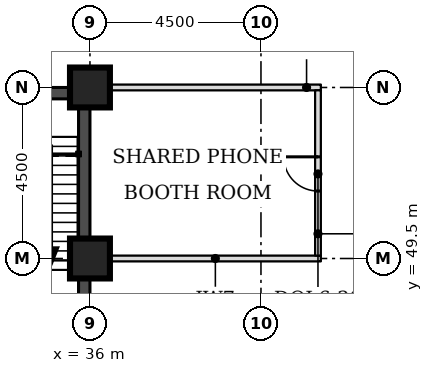
"""IFC4 building model, lengths in metres.
Left out: names, types, materials, properties, quantities, classifications, styles, units other than length and angle.
Written with IfcOpenShell. Run it as: python <this file> out.ifc"""

import sys

from ifc_helpers import new_model, si_unit, direction, frame, frame_2d, origin, origin_2d, place, context, subcontext, project, spatial, rectangle, extrude, element, fill, save


model = new_model("IFC4")
c1 = context("Model", 3, precision=1e-05, world=origin(), true_north=direction((0.0, 1.0)))
c2 = subcontext(c1, "Body", "Model", "MODEL_VIEW")
j1 = project(units=[si_unit("LENGTHUNIT", "METRE"), si_unit("PLANEANGLEUNIT", "RADIAN")], contexts=[c1])
p1 = place(None, origin())
s1 = spatial("IfcSite", under=j1, at=p1, CompositionType="ELEMENT")
p2 = place(p1, origin())
s2 = spatial("IfcBuilding", under=s1, at=p2, CompositionType="ELEMENT")
p3 = place(p2, frame((0.0, 0.0, 119.6)))
s3 = spatial("IfcBuildingStorey", under=s2, at=p3, CompositionType="ELEMENT", Elevation=119.6)
for number, where, z_axis, x_axis in (
    (1, (36.0, 49.5, 0.0), (0.0, 0.0, 1.0), (1.0, 0.0, 0.0)),
    (2, (36.0, 54.0, 0.0), (0.0, 0.0, 1.0), (1.0, 0.0, 0.0)),
):
    element("IfcColumn", number, at=place(p3, frame(where, z_axis=z_axis, x_axis=x_axis)), inside=s3, PredefinedType="COLUMN", context=c2, shape_type="SweptSolid", body=[
        extrude(rectangle(XDim=1.05, YDim=1.05, at=origin_2d()), origin(), (0.0, 0.0, 1.0), 3.7),
    ])
p4 = place(p3, frame((27.3, 53.85, 0.0), z_axis=(0.0, 0.0, 1.0), x_axis=(1.0, 0.0, 0.0)))
e3 = element("IfcWall", 3, at=p4, inside=s3, PredefinedType="SHEAR", context=c2, shape_type="SweptSolid", body=[
    extrude(rectangle(XDim=8.4, YDim=0.3, at=frame_2d((4.2, 0.0))), origin(), (0.0, 0.0, 1.0), 3.7),
])
p5 = place(p4, frame((6.4, 0.0, 0.0)))
e4 = element("IfcOpeningElement", 4, at=p5, cuts=e3, PredefinedType="OPENING", context=c2, shape_type="SweptSolid", body=[
    extrude(rectangle(XDim=1.1, YDim=2.1, at=frame_2d((0.55, 1.05))), frame((0.0, 0.16, 0.0), z_axis=(0.0, -1.0, 0.0), x_axis=(1.0, 0.0, 0.0)), (0.0, 0.0, 1.0), 0.32),
])
p6 = place(p3, frame((35.85, 45.0, 0.0), z_axis=(0.0, 0.0, 1.0), x_axis=(0.0, 1.0, 0.0)))
e5 = element("IfcWall", 5, at=p6, inside=s3, PredefinedType="SHEAR", context=c2, shape_type="SweptSolid", body=[
    extrude(rectangle(XDim=9.0, YDim=0.3, at=frame_2d((4.5, 0.0))), origin(), (0.0, 0.0, 1.0), 3.7),
])
for number, where, z_axis, x_axis in (
    (6, (36.525, 49.5, 0.0), (0.0, 0.0, 1.0), (1.0, 0.0, 0.0)),
    (7, (36.525, 54.0, 0.0), (0.0, 0.0, 1.0), (1.0, 0.0, 0.0)),
):
    element("IfcWall", number, at=place(p3, frame(where, z_axis=z_axis, x_axis=x_axis)), inside=s3, PredefinedType="PARTITIONING", context=c2, shape_type="SweptSolid", body=[
        extrude(rectangle(XDim=5.55, YDim=0.15, at=frame_2d((2.775, 0.0))), origin(), (0.0, 0.0, 1.0), 3.55),
    ])
p7 = place(p3, frame((42.0, 49.575, 0.0), z_axis=(0.0, 0.0, 1.0), x_axis=(0.0, 1.0, 0.0)))
e8 = element("IfcWall", 8, at=p7, inside=s3, PredefinedType="PARTITIONING", context=c2, shape_type="SweptSolid", body=[
    extrude(rectangle(XDim=4.35, YDim=0.15, at=frame_2d((2.175, 0.0))), origin(), (0.0, 0.0, 1.0), 3.55),
])
p8 = place(p7, frame((1.7, 0.0, 0.0)))
e9 = element("IfcOpeningElement", 9, at=p8, cuts=e8, PredefinedType="OPENING", context=c2, shape_type="SweptSolid", body=[
    extrude(rectangle(XDim=0.9, YDim=2.1, at=frame_2d((0.45, 1.05))), frame((0.0, 0.085, 0.0), z_axis=(0.0, -1.0, 0.0), x_axis=(1.0, 0.0, 0.0)), (0.0, 0.0, 1.0), 0.17),
])
p9 = place(p8, origin())
e10 = element("IfcDoor", 10, at=p9, inside=s3, OperationType="SINGLE_SWING_RIGHT", PredefinedType="DOOR", context=c2, shape_type="SweptSolid", body=[
    extrude(rectangle(XDim=0.9, YDim=2.1, at=frame_2d((0.45, 1.05))), frame((0.0, 0.025, 0.0), z_axis=(0.0, -1.0, 0.0), x_axis=(1.0, 0.0, 0.0)), (0.0, 0.0, 1.0), 0.05),
])
fill(e9, e10)
save(model, sys.argv[1])
